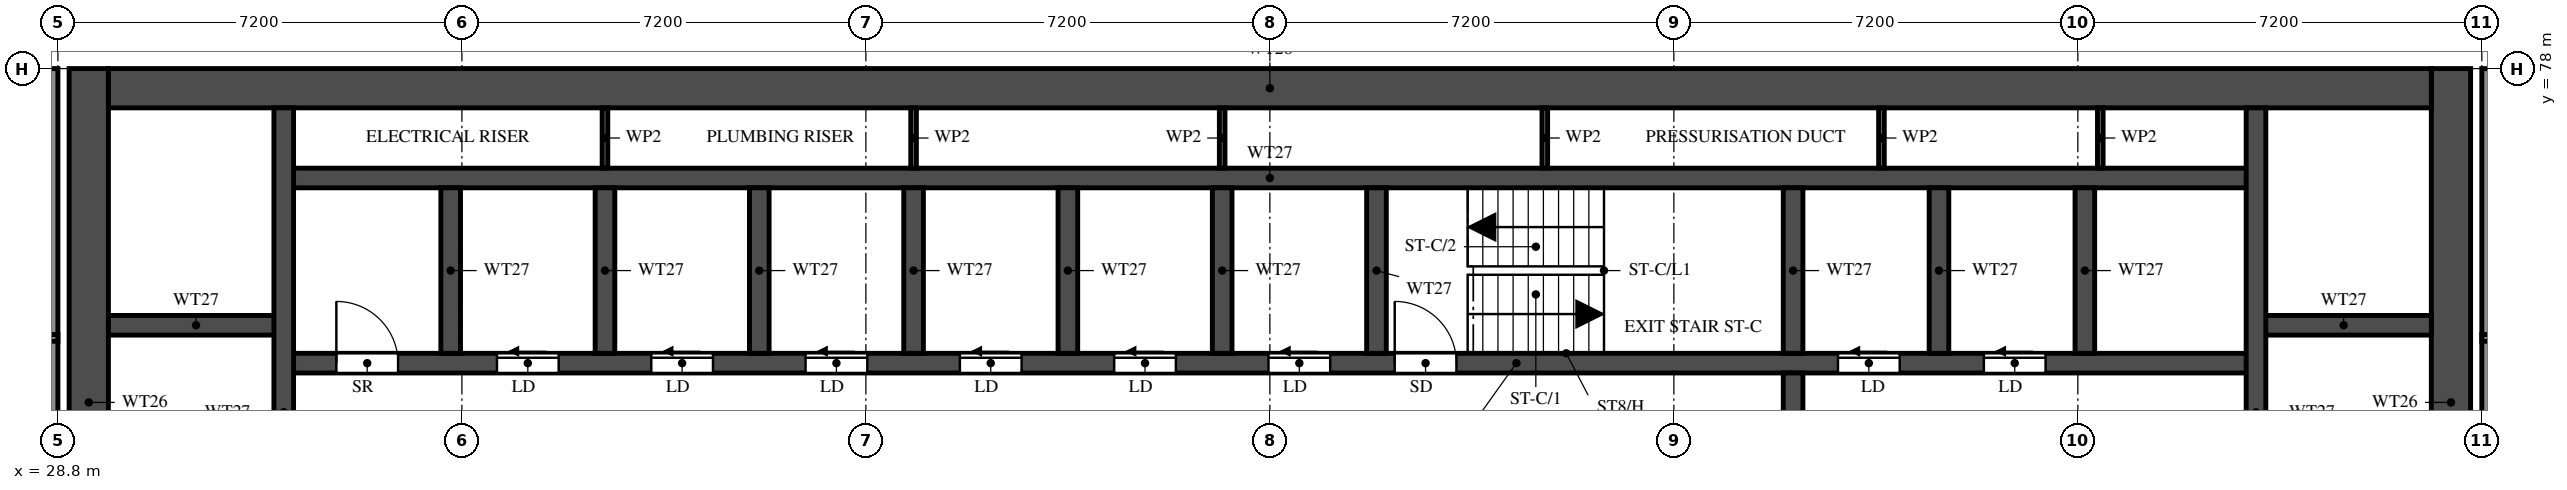
"""IFC4 building model, lengths in metres.
Left out: names, types, materials, properties, quantities, classifications, styles, units other than length and angle.
Written with IfcOpenShell. Run it as: python <this file> out.ifc"""

import sys

from ifc_helpers import new_model, si_unit, direction, frame, frame_2d, origin, place, context, subcontext, project, spatial, rectangle, extrude, element, fill, save


model = new_model("IFC4")
c1 = context("Model", 3, precision=1e-05, world=origin(), true_north=direction((0.0, 1.0)))
c2 = subcontext(c1, "Body", "Model", "MODEL_VIEW")
j1 = project(units=[si_unit("LENGTHUNIT", "METRE"), si_unit("PLANEANGLEUNIT", "RADIAN")], contexts=[c1])
p1 = place(None, origin())
s1 = spatial("IfcSite", under=j1, at=p1, CompositionType="ELEMENT")
p2 = place(p1, origin())
s2 = spatial("IfcBuilding", under=s1, at=p2, CompositionType="ELEMENT")
p3 = place(p2, frame((0.0, 0.0, 192.0)))
s3 = spatial("IfcBuildingStorey", under=s2, at=p3, CompositionType="ELEMENT", Elevation=192.0)
for number, where, z_axis, x_axis in (
    (1, (29.35, 66.1, 0.0), (0.0, 0.0, 1.0), (0.0, 1.0, 0.0)),
    (2, (71.45, 66.1, 0.0), (0.0, 0.0, 1.0), (0.0, 1.0, 0.0)),
):
    element("IfcWall", number, at=place(p3, frame(where, z_axis=z_axis, x_axis=x_axis)), inside=s3, PredefinedType="SHEAR", context=c2, shape_type="SweptSolid", body=[
        extrude(rectangle(XDim=11.9, YDim=0.7, at=frame_2d((5.95, 0.0))), origin(), (0.0, 0.0, 1.0), 3.2),
    ])
p4 = place(p3, frame((29.7, 77.65, 0.0), z_axis=(0.0, 0.0, 1.0), x_axis=(1.0, 0.0, 0.0)))
e3 = element("IfcWall", 3, at=p4, inside=s3, PredefinedType="SHEAR", context=c2, shape_type="SweptSolid", body=[
    extrude(rectangle(XDim=41.4, YDim=0.7, at=frame_2d((20.7, 0.0))), origin(), (0.0, 0.0, 1.0), 3.2),
])
p5 = place(p3, frame((32.825, 72.75, 0.0), z_axis=(0.0, 0.0, 1.0), x_axis=(1.0, 0.0, 0.0)))
e4 = element("IfcWall", 4, at=p5, inside=s3, PredefinedType="SHEAR", context=c2, shape_type="SweptSolid", body=[
    extrude(rectangle(XDim=35.15, YDim=0.35, at=frame_2d((17.575, 0.0))), origin(), (0.0, 0.0, 1.0), 3.2),
])
p6 = place(p5, frame((19.8, 0.0, 0.0)))
e5 = element("IfcOpeningElement", 5, at=p6, cuts=e4, PredefinedType="OPENING", context=c2, shape_type="SweptSolid", body=[
    extrude(rectangle(XDim=1.1, YDim=2.1, at=frame_2d((0.55, 1.05))), frame((0.0, 0.185, 0.0), z_axis=(0.0, -1.0, 0.0), x_axis=(1.0, 0.0, 0.0)), (0.0, 0.0, 1.0), 0.37),
])
p7 = place(p5, frame((27.7, 0.0, 0.0)))
e6 = element("IfcOpeningElement", 6, at=p7, cuts=e4, PredefinedType="OPENING", context=c2, shape_type="SweptSolid", body=[
    extrude(rectangle(XDim=1.1, YDim=2.1, at=frame_2d((0.55, 1.05))), frame((0.0, 0.185, 0.0), z_axis=(0.0, -1.0, 0.0), x_axis=(1.0, 0.0, 0.0)), (0.0, 0.0, 1.0), 0.37),
])
p8 = place(p5, frame((30.3, 0.0, 0.0)))
e7 = element("IfcOpeningElement", 7, at=p8, cuts=e4, PredefinedType="OPENING", context=c2, shape_type="SweptSolid", body=[
    extrude(rectangle(XDim=1.1, YDim=2.1, at=frame_2d((0.55, 1.05))), frame((0.0, 0.185, 0.0), z_axis=(0.0, -1.0, 0.0), x_axis=(1.0, 0.0, 0.0)), (0.0, 0.0, 1.0), 0.37),
])
p9 = place(p5, frame((3.8, 0.0, 0.0)))
e8 = element("IfcOpeningElement", 8, at=p9, cuts=e4, PredefinedType="OPENING", context=c2, shape_type="SweptSolid", body=[
    extrude(rectangle(XDim=1.1, YDim=2.1, at=frame_2d((0.55, 1.05))), frame((0.0, 0.185, 0.0), z_axis=(0.0, -1.0, 0.0), x_axis=(1.0, 0.0, 0.0)), (0.0, 0.0, 1.0), 0.37),
])
p10 = place(p5, frame((6.55, 0.0, 0.0)))
e9 = element("IfcOpeningElement", 9, at=p10, cuts=e4, PredefinedType="OPENING", context=c2, shape_type="SweptSolid", body=[
    extrude(rectangle(XDim=1.1, YDim=2.1, at=frame_2d((0.55, 1.05))), frame((0.0, 0.185, 0.0), z_axis=(0.0, -1.0, 0.0), x_axis=(1.0, 0.0, 0.0)), (0.0, 0.0, 1.0), 0.37),
])
p11 = place(p5, frame((9.3, 0.0, 0.0)))
e10 = element("IfcOpeningElement", 10, at=p11, cuts=e4, PredefinedType="OPENING", context=c2, shape_type="SweptSolid", body=[
    extrude(rectangle(XDim=1.1, YDim=2.1, at=frame_2d((0.55, 1.05))), frame((0.0, 0.185, 0.0), z_axis=(0.0, -1.0, 0.0), x_axis=(1.0, 0.0, 0.0)), (0.0, 0.0, 1.0), 0.37),
])
p12 = place(p5, frame((12.05, 0.0, 0.0)))
e11 = element("IfcOpeningElement", 11, at=p12, cuts=e4, PredefinedType="OPENING", context=c2, shape_type="SweptSolid", body=[
    extrude(rectangle(XDim=1.1, YDim=2.1, at=frame_2d((0.55, 1.05))), frame((0.0, 0.185, 0.0), z_axis=(0.0, -1.0, 0.0), x_axis=(1.0, 0.0, 0.0)), (0.0, 0.0, 1.0), 0.37),
])
p13 = place(p5, frame((14.8, 0.0, 0.0)))
e12 = element("IfcOpeningElement", 12, at=p13, cuts=e4, PredefinedType="OPENING", context=c2, shape_type="SweptSolid", body=[
    extrude(rectangle(XDim=1.1, YDim=2.1, at=frame_2d((0.55, 1.05))), frame((0.0, 0.185, 0.0), z_axis=(0.0, -1.0, 0.0), x_axis=(1.0, 0.0, 0.0)), (0.0, 0.0, 1.0), 0.37),
])
p14 = place(p5, frame((17.55, 0.0, 0.0)))
e13 = element("IfcOpeningElement", 13, at=p14, cuts=e4, PredefinedType="OPENING", context=c2, shape_type="SweptSolid", body=[
    extrude(rectangle(XDim=1.1, YDim=2.1, at=frame_2d((0.55, 1.05))), frame((0.0, 0.185, 0.0), z_axis=(0.0, -1.0, 0.0), x_axis=(1.0, 0.0, 0.0)), (0.0, 0.0, 1.0), 0.37),
])
p15 = place(p5, frame((0.938, 0.0, 0.0)))
e14 = element("IfcOpeningElement", 14, at=p15, cuts=e4, PredefinedType="OPENING", context=c2, shape_type="SweptSolid", body=[
    extrude(rectangle(XDim=1.1, YDim=2.1, at=frame_2d((0.55, 1.05))), frame((0.0, 0.185, 0.0), z_axis=(0.0, -1.0, 0.0), x_axis=(1.0, 0.0, 0.0)), (0.0, 0.0, 1.0), 0.37),
])
p16 = place(p3, frame((32.825, 76.05, 0.0), z_axis=(0.0, 0.0, 1.0), x_axis=(1.0, 0.0, 0.0)))
e15 = element("IfcWall", 15, at=p16, inside=s3, PredefinedType="SHEAR", context=c2, shape_type="SweptSolid", body=[
    extrude(rectangle(XDim=35.15, YDim=0.35, at=frame_2d((17.575, 0.0))), origin(), (0.0, 0.0, 1.0), 3.2),
])
for number, where, z_axis, x_axis in (
    (16, (29.7, 73.425, 0.0), (0.0, 0.0, 1.0), (1.0, 0.0, 0.0)),
    (17, (67.975, 73.425, 0.0), (0.0, 0.0, 1.0), (1.0, 0.0, 0.0)),
):
    element("IfcWall", number, at=place(p3, frame(where, z_axis=z_axis, x_axis=x_axis)), inside=s3, PredefinedType="SHEAR", context=c2, shape_type="SweptSolid", body=[
        extrude(rectangle(XDim=3.125, YDim=0.35, at=frame_2d((1.562, 0.0))), origin(), (0.0, 0.0, 1.0), 3.2),
    ])
p17 = place(p3, frame((32.825, 66.45, 0.0), z_axis=(0.0, 0.0, 1.0), x_axis=(0.0, 1.0, 0.0)))
e18 = element("IfcWall", 18, at=p17, inside=s3, PredefinedType="SHEAR", context=c2, shape_type="SweptSolid", body=[
    extrude(rectangle(XDim=10.85, YDim=0.35, at=frame_2d((5.425, 0.0))), origin(), (0.0, 0.0, 1.0), 3.2),
])
p18 = place(p3, frame((67.975, 66.45, 0.0), z_axis=(0.0, 0.0, 1.0), x_axis=(0.0, 1.0, 0.0)))
e19 = element("IfcWall", 19, at=p18, inside=s3, PredefinedType="SHEAR", context=c2, shape_type="SweptSolid", body=[
    extrude(rectangle(XDim=10.85, YDim=0.35, at=frame_2d((5.425, 0.0))), origin(), (0.0, 0.0, 1.0), 3.2),
])
p19 = place(p18, frame((0.15, 0.0, 0.0)))
e20 = element("IfcOpeningElement", 20, at=p19, cuts=e19, PredefinedType="OPENING", context=c2, shape_type="SweptSolid", body=[
    extrude(rectangle(XDim=1.1, YDim=2.1, at=frame_2d((0.55, 1.05))), frame((0.0, 0.185, 0.0), z_axis=(0.0, -1.0, 0.0), x_axis=(1.0, 0.0, 0.0)), (0.0, 0.0, 1.0), 0.37),
])
p20 = place(p3, frame((59.725, 66.45, 0.0), z_axis=(0.0, 0.0, 1.0), x_axis=(0.0, 1.0, 0.0)))
e21 = element("IfcWall", 21, at=p20, inside=s3, PredefinedType="SHEAR", context=c2, shape_type="SweptSolid", body=[
    extrude(rectangle(XDim=6.125, YDim=0.35, at=frame_2d((3.062, 0.0))), origin(), (0.0, 0.0, 1.0), 3.2),
])
p21 = place(p20, frame((3.85, 0.0, 0.0)))
e22 = element("IfcOpeningElement", 22, at=p21, cuts=e21, PredefinedType="OPENING", context=c2, shape_type="SweptSolid", body=[
    extrude(rectangle(XDim=1.2, YDim=2.1, at=frame_2d((0.6, 1.05))), frame((0.0, 0.185, 0.0), z_axis=(0.0, -1.0, 0.0), x_axis=(1.0, 0.0, 0.0)), (0.0, 0.0, 1.0), 0.37),
])
for number, where, z_axis, x_axis in (
    (23, (59.725, 72.925, 0.0), (0.0, 0.0, 1.0), (0.0, 1.0, 0.0)),
    (24, (35.8, 72.925, 0.0), (0.0, 0.0, 1.0), (0.0, 1.0, 0.0)),
    (25, (38.55, 72.925, 0.0), (0.0, 0.0, 1.0), (0.0, 1.0, 0.0)),
    (26, (41.3, 72.925, 0.0), (0.0, 0.0, 1.0), (0.0, 1.0, 0.0)),
    (27, (44.05, 72.925, 0.0), (0.0, 0.0, 1.0), (0.0, 1.0, 0.0)),
    (28, (46.8, 72.925, 0.0), (0.0, 0.0, 1.0), (0.0, 1.0, 0.0)),
    (29, (49.55, 72.925, 0.0), (0.0, 0.0, 1.0), (0.0, 1.0, 0.0)),
    (30, (52.3, 72.925, 0.0), (0.0, 0.0, 1.0), (0.0, 1.0, 0.0)),
    (31, (62.325, 72.925, 0.0), (0.0, 0.0, 1.0), (0.0, 1.0, 0.0)),
    (32, (64.925, 72.925, 0.0), (0.0, 0.0, 1.0), (0.0, 1.0, 0.0)),
):
    element("IfcWall", number, at=place(p3, frame(where, z_axis=z_axis, x_axis=x_axis)), inside=s3, PredefinedType="SHEAR", context=c2, shape_type="SweptSolid", body=[
        extrude(rectangle(XDim=2.95, YDim=0.35, at=frame_2d((1.475, 0.0))), origin(), (0.0, 0.0, 1.0), 3.2),
    ])
for number, where, z_axis, x_axis in (
    (33, (38.55, 76.225, 0.0), (0.0, 0.0, 1.0), (0.0, 1.0, 0.0)),
    (34, (44.05, 76.225, 0.0), (0.0, 0.0, 1.0), (0.0, 1.0, 0.0)),
    (35, (49.55, 76.225, 0.0), (0.0, 0.0, 1.0), (0.0, 1.0, 0.0)),
    (36, (55.3, 76.225, 0.0), (0.0, 0.0, 1.0), (0.0, 1.0, 0.0)),
    (37, (61.3, 76.225, 0.0), (0.0, 0.0, 1.0), (0.0, 1.0, 0.0)),
    (38, (65.2, 76.225, 0.0), (0.0, 0.0, 1.0), (0.0, 1.0, 0.0)),
):
    element("IfcWall", number, at=place(p3, frame(where, z_axis=z_axis, x_axis=x_axis)), inside=s3, PredefinedType="PARTITIONING", context=c2, shape_type="SweptSolid", body=[
        extrude(rectangle(XDim=1.075, YDim=0.1, at=frame_2d((0.538, 0.0))), origin(), (0.0, 0.0, 1.0), 3.2),
    ])
for number, where, z_axis, x_axis in (
    (39, (28.7, 62.4, 0.0), (0.0, 0.0, 1.0), (0.0, 1.0, 0.0)),
    (40, (72.1, 62.4, 0.0), (0.0, 0.0, 1.0), (0.0, 1.0, 0.0)),
):
    element("IfcWall", number, at=place(p3, frame(where, z_axis=z_axis, x_axis=x_axis)), inside=s3, PredefinedType="SOLIDWALL", context=c2, shape_type="SweptSolid", body=[
        extrude(rectangle(XDim=15.6, YDim=0.2, at=frame_2d((7.8, 0.0))), origin(), (0.0, 0.0, 1.0), 3.2),
    ])
p22 = place(p3, frame((14.525, 73.2, 0.0), z_axis=(0.0, 0.0, 1.0), x_axis=(1.0, 0.0, 0.0)))
e41 = element("IfcWall", 41, at=p22, inside=s3, PredefinedType="PARTITIONING", context=c2, shape_type="SweptSolid", body=[
    extrude(rectangle(XDim=14.275, YDim=0.12, at=frame_2d((7.138, 0.0))), origin(), (0.0, 0.0, 1.0), 2.3),
])
p23 = place(p22, frame((7.675, 0.0, 0.0)))
e42 = element("IfcOpeningElement", 42, at=p23, cuts=e41, PredefinedType="OPENING", context=c2, shape_type="SweptSolid", body=[
    extrude(rectangle(XDim=0.9, YDim=2.1, at=frame_2d((0.45, 1.05))), frame((0.0, 0.07, 0.0), z_axis=(0.0, -1.0, 0.0), x_axis=(1.0, 0.0, 0.0)), (0.0, 0.0, 1.0), 0.14),
])
p24 = place(p3, frame((72.0, 73.2, 0.0), z_axis=(0.0, 0.0, 1.0), x_axis=(1.0, 0.0, 0.0)))
e43 = element("IfcWall", 43, at=p24, inside=s3, PredefinedType="PARTITIONING", context=c2, shape_type="SweptSolid", body=[
    extrude(rectangle(XDim=14.275, YDim=0.12, at=frame_2d((7.137, 0.0))), origin(), (0.0, 0.0, 1.0), 2.3),
])
p25 = place(p24, frame((5.7, 0.0, 0.0)))
e44 = element("IfcOpeningElement", 44, at=p25, cuts=e43, PredefinedType="OPENING", context=c2, shape_type="SweptSolid", body=[
    extrude(rectangle(XDim=0.9, YDim=2.1, at=frame_2d((0.45, 1.05))), frame((0.0, 0.07, 0.0), z_axis=(0.0, -1.0, 0.0), x_axis=(1.0, 0.0, 0.0)), (0.0, 0.0, 1.0), 0.14),
])
p26 = place(p6, origin())
e45 = element("IfcDoor", 45, at=p26, inside=s3, OperationType="SINGLE_SWING_LEFT", PredefinedType="DOOR", context=c2, shape_type="SweptSolid", body=[
    extrude(rectangle(XDim=1.1, YDim=2.1, at=frame_2d((0.55, 1.05))), frame((0.0, 0.025, 0.0), z_axis=(0.0, -1.0, 0.0), x_axis=(1.0, 0.0, 0.0)), (0.0, 0.0, 1.0), 0.05),
])
fill(e5, e45)
p27 = place(p7, origin())
e46 = element("IfcDoor", 46, at=p27, inside=s3, OperationType="SLIDING_TO_LEFT", PredefinedType="DOOR", context=c2, shape_type="SweptSolid", body=[
    extrude(rectangle(XDim=1.1, YDim=2.1, at=frame_2d((0.55, 1.05))), frame((0.0, 0.025, 0.0), z_axis=(0.0, -1.0, 0.0), x_axis=(1.0, 0.0, 0.0)), (0.0, 0.0, 1.0), 0.05),
])
fill(e6, e46)
p28 = place(p8, origin())
e47 = element("IfcDoor", 47, at=p28, inside=s3, OperationType="SLIDING_TO_LEFT", PredefinedType="DOOR", context=c2, shape_type="SweptSolid", body=[
    extrude(rectangle(XDim=1.1, YDim=2.1, at=frame_2d((0.55, 1.05))), frame((0.0, 0.025, 0.0), z_axis=(0.0, -1.0, 0.0), x_axis=(1.0, 0.0, 0.0)), (0.0, 0.0, 1.0), 0.05),
])
fill(e7, e47)
p29 = place(p9, origin())
e48 = element("IfcDoor", 48, at=p29, inside=s3, OperationType="SLIDING_TO_LEFT", PredefinedType="DOOR", context=c2, shape_type="SweptSolid", body=[
    extrude(rectangle(XDim=1.1, YDim=2.1, at=frame_2d((0.55, 1.05))), frame((0.0, 0.025, 0.0), z_axis=(0.0, -1.0, 0.0), x_axis=(1.0, 0.0, 0.0)), (0.0, 0.0, 1.0), 0.05),
])
fill(e8, e48)
p30 = place(p10, origin())
e49 = element("IfcDoor", 49, at=p30, inside=s3, OperationType="SLIDING_TO_LEFT", PredefinedType="DOOR", context=c2, shape_type="SweptSolid", body=[
    extrude(rectangle(XDim=1.1, YDim=2.1, at=frame_2d((0.55, 1.05))), frame((0.0, 0.025, 0.0), z_axis=(0.0, -1.0, 0.0), x_axis=(1.0, 0.0, 0.0)), (0.0, 0.0, 1.0), 0.05),
])
fill(e9, e49)
p31 = place(p11, origin())
e50 = element("IfcDoor", 50, at=p31, inside=s3, OperationType="SLIDING_TO_LEFT", PredefinedType="DOOR", context=c2, shape_type="SweptSolid", body=[
    extrude(rectangle(XDim=1.1, YDim=2.1, at=frame_2d((0.55, 1.05))), frame((0.0, 0.025, 0.0), z_axis=(0.0, -1.0, 0.0), x_axis=(1.0, 0.0, 0.0)), (0.0, 0.0, 1.0), 0.05),
])
fill(e10, e50)
p32 = place(p12, origin())
e51 = element("IfcDoor", 51, at=p32, inside=s3, OperationType="SLIDING_TO_LEFT", PredefinedType="DOOR", context=c2, shape_type="SweptSolid", body=[
    extrude(rectangle(XDim=1.1, YDim=2.1, at=frame_2d((0.55, 1.05))), frame((0.0, 0.025, 0.0), z_axis=(0.0, -1.0, 0.0), x_axis=(1.0, 0.0, 0.0)), (0.0, 0.0, 1.0), 0.05),
])
fill(e11, e51)
p33 = place(p13, origin())
e52 = element("IfcDoor", 52, at=p33, inside=s3, OperationType="SLIDING_TO_LEFT", PredefinedType="DOOR", context=c2, shape_type="SweptSolid", body=[
    extrude(rectangle(XDim=1.1, YDim=2.1, at=frame_2d((0.55, 1.05))), frame((0.0, 0.025, 0.0), z_axis=(0.0, -1.0, 0.0), x_axis=(1.0, 0.0, 0.0)), (0.0, 0.0, 1.0), 0.05),
])
fill(e12, e52)
p34 = place(p14, origin())
e53 = element("IfcDoor", 53, at=p34, inside=s3, OperationType="SLIDING_TO_LEFT", PredefinedType="DOOR", context=c2, shape_type="SweptSolid", body=[
    extrude(rectangle(XDim=1.1, YDim=2.1, at=frame_2d((0.55, 1.05))), frame((0.0, 0.025, 0.0), z_axis=(0.0, -1.0, 0.0), x_axis=(1.0, 0.0, 0.0)), (0.0, 0.0, 1.0), 0.05),
])
fill(e13, e53)
p35 = place(p15, origin())
e54 = element("IfcDoor", 54, at=p35, inside=s3, OperationType="SINGLE_SWING_LEFT", PredefinedType="DOOR", context=c2, shape_type="SweptSolid", body=[
    extrude(rectangle(XDim=1.1, YDim=2.1, at=frame_2d((0.55, 1.05))), frame((0.0, 0.025, 0.0), z_axis=(0.0, -1.0, 0.0), x_axis=(1.0, 0.0, 0.0)), (0.0, 0.0, 1.0), 0.05),
])
fill(e14, e54)
save(model, sys.argv[1])
